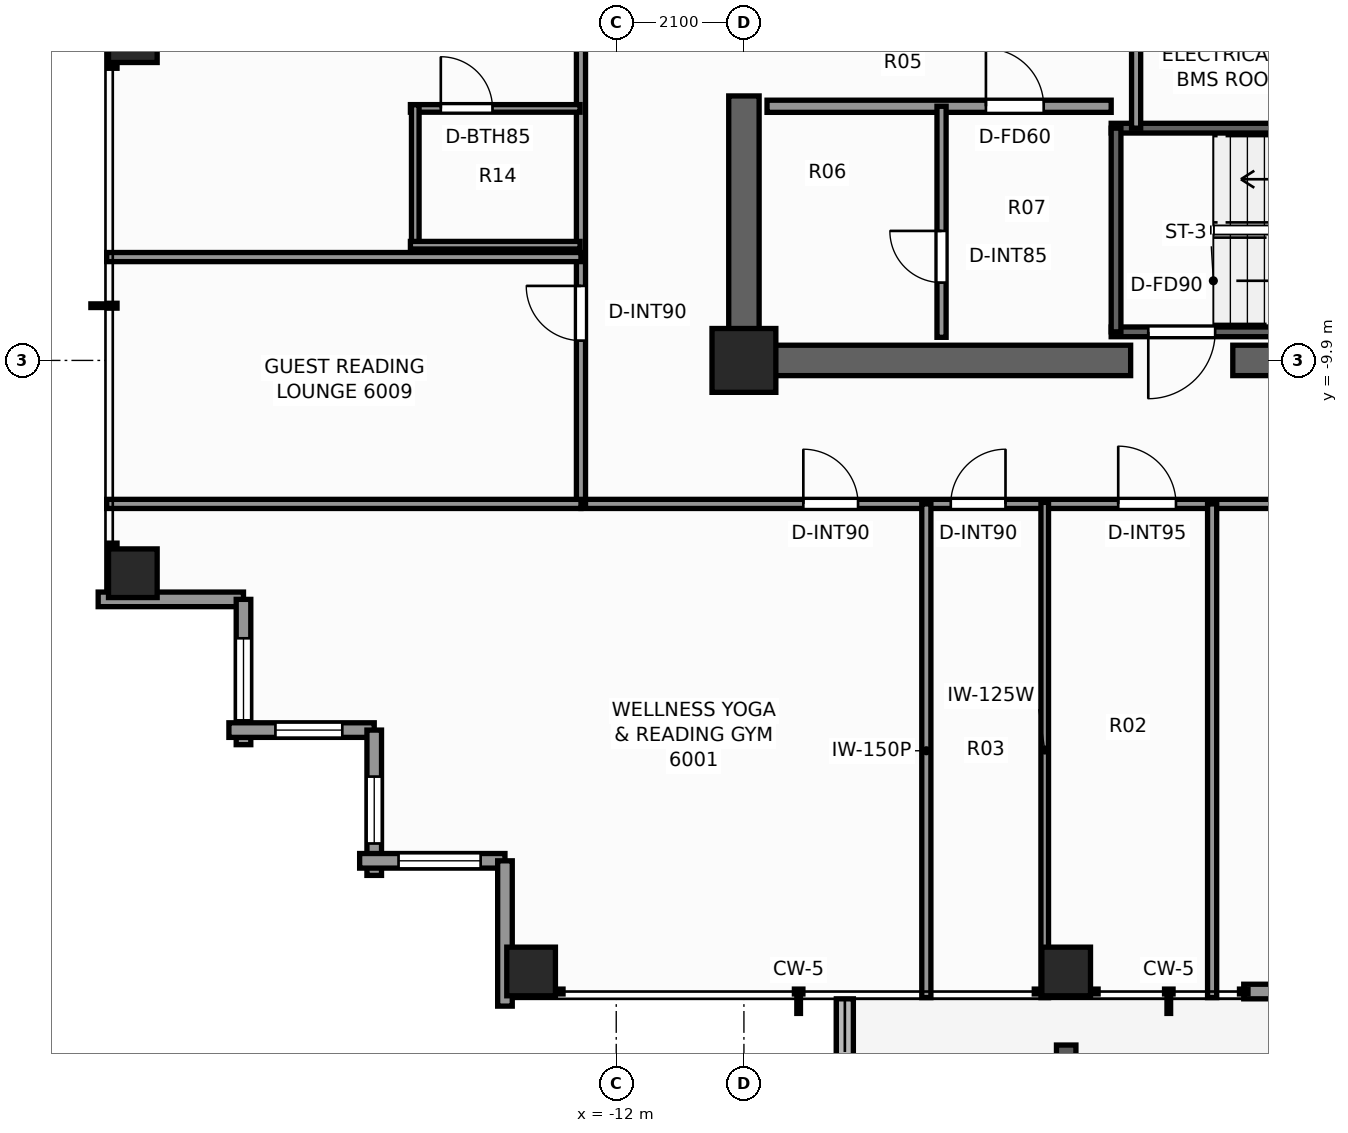
"""IFC4 building model, lengths in metres.
Left out: names, types, materials, properties, quantities, classifications, styles, units other than length and angle.
Written with IfcOpenShell. Run it as: python <this file> out.ifc"""

import sys

from ifc_helpers import new_model, si_unit, direction, frame, frame_2d, origin, origin_2d, place, context, subcontext, project, spatial, rectangle, extrude, element, fill, save


model = new_model("IFC4")
c1 = context("Model", 3, precision=1e-05, world=origin(), true_north=direction((0.0, 1.0)))
c2 = subcontext(c1, "Body", "Model", "MODEL_VIEW")
j1 = project(units=[si_unit("LENGTHUNIT", "METRE"), si_unit("PLANEANGLEUNIT", "RADIAN")], contexts=[c1])
p1 = place(None, origin())
s1 = spatial("IfcSite", under=j1, at=p1, CompositionType="ELEMENT")
p2 = place(p1, origin())
s2 = spatial("IfcBuilding", under=s1, at=p2, CompositionType="ELEMENT")
p3 = place(p2, frame((0.0, 0.0, 206.4)))
s3 = spatial("IfcBuildingStorey", under=s2, at=p3, CompositionType="ELEMENT", Elevation=206.4)
p4 = place(p3, frame((10.15, -9.9, 0.0), z_axis=(0.0, 0.0, 1.0), x_axis=(-1.0, 0.0, 0.0)))
e1 = element("IfcWall", 1, at=p4, inside=s3, PredefinedType="SHEAR", context=c2, shape_type="SweptSolid", body=[
    extrude(rectangle(XDim=12.01, YDim=0.5, at=frame_2d((6.005, 0.0))), origin(), (0.0, 0.0, 1.0), 3.3),
])
p5 = place(p3, frame((-3.54, -9.9, 0.0), z_axis=(0.0, 0.0, 1.0), x_axis=(-1.0, 0.0, 0.0)))
e2 = element("IfcWall", 2, at=p5, inside=s3, PredefinedType="SHEAR", context=c2, shape_type="SweptSolid", body=[
    extrude(rectangle(XDim=6.61, YDim=0.5, at=frame_2d((3.305, 0.0))), origin(), (0.0, 0.0, 1.0), 3.3),
])
p6 = place(p3, frame((-9.9, -9.65, 0.0), z_axis=(0.0, 0.0, 1.0), x_axis=(0.0, 1.0, 0.0)))
e3 = element("IfcWall", 3, at=p6, inside=s3, PredefinedType="SHEAR", context=c2, shape_type="SweptSolid", body=[
    extrude(rectangle(XDim=4.1, YDim=0.5, at=frame_2d((2.05, 0.0))), origin(), (0.0, 0.0, 1.0), 3.3),
])
p7 = place(p3, frame((-9.9, -9.9, 0.0), z_axis=(0.0, 0.0, 1.0), x_axis=(1.0, 0.0, 0.0)))
e4 = element("IfcColumn", 4, at=p7, inside=s3, PredefinedType="COLUMN", context=c2, shape_type="SweptSolid", body=[
    extrude(rectangle(XDim=1.05, YDim=1.05, at=origin_2d()), origin(), (0.0, 0.0, 1.0), 3.3),
])
for number, where, z_axis, x_axis in (
    (5, (-13.4, -19.95, 0.0), (0.0, 0.0, 1.0), (1.0, 0.0, 0.0)),
    (6, (-4.6, -19.95, 0.0), (0.0, 0.0, 1.0), (1.0, 0.0, 0.0)),
    (7, (-19.95, -13.4, 0.0), (0.0, 0.0, 1.0), (1.0, 0.0, 0.0)),
    (8, (-19.95, -4.6, 0.0), (0.0, 0.0, 1.0), (1.0, 0.0, 0.0)),
):
    element("IfcColumn", number, at=place(p3, frame(where, z_axis=z_axis, x_axis=x_axis)), inside=s3, PredefinedType="COLUMN", context=c2, shape_type="SweptSolid", body=[
        extrude(rectangle(XDim=0.8, YDim=0.8, at=origin_2d()), origin(), (0.0, 0.0, 1.0), 3.3),
    ])
p8 = place(p3, frame((-8.24, -20.4, -0.04), z_axis=(0.0, 0.0, 1.0), x_axis=(0.0, -1.0, 0.0)))
e9 = element("IfcWall", 9, at=p8, inside=s3, PredefinedType="PARAPET", context=c2, shape_type="SweptSolid", body=[
    extrude(rectangle(XDim=3.42, YDim=0.28, at=frame_2d((1.71, 0.0))), origin(), (0.0, 0.0, 1.0), 0.42),
])
p9 = place(p3, frame((1.68, -20.28, 0.0), z_axis=(0.0, 0.0, 1.0), x_axis=(-1.0, 0.0, 0.0)))
e10 = element("IfcWall", 10, at=p9, inside=s3, PredefinedType="STANDARD", context=c2, shape_type="SweptSolid", body=[
    extrude(rectangle(XDim=3.36, YDim=0.24, at=frame_2d((1.68, 0.0))), origin(), (0.0, 0.0, 1.0), 3.08),
])
p10 = place(p9, frame((0.78, 0.0, 0.0)))
e11 = element("IfcOpeningElement", 11, at=p10, cuts=e10, PredefinedType="OPENING", context=c2, shape_type="SweptSolid", body=[
    extrude(rectangle(XDim=1.8, YDim=2.2, at=frame_2d((0.9, 1.1))), frame((0.0, 0.13, 0.0), z_axis=(0.0, -1.0, 0.0), x_axis=(1.0, 0.0, 0.0)), (0.0, 0.0, 1.0), 0.26),
])
p11 = place(p3, frame((-18.13, -13.83, 0.0), z_axis=(0.0, 0.0, 1.0), x_axis=(-1.0, 0.0, 0.0)))
e12 = element("IfcWall", 12, at=p11, inside=s3, PredefinedType="STANDARD", context=c2, shape_type="SweptSolid", body=[
    extrude(rectangle(XDim=2.39, YDim=0.24, at=frame_2d((1.195, 0.0))), origin(), (0.0, 0.0, 1.0), 2.463),
])
p12 = place(p3, frame((-18.13, -16.22, 0.0), z_axis=(0.0, 0.0, 1.0), x_axis=(0.0, 1.0, 0.0)))
e13 = element("IfcWall", 13, at=p12, inside=s3, PredefinedType="STANDARD", context=c2, shape_type="SweptSolid", body=[
    extrude(rectangle(XDim=2.39, YDim=0.24, at=frame_2d((1.195, 0.0))), origin(), (0.0, 0.0, 1.0), 2.463),
])
p13 = place(p12, frame((0.4, 0.0, 0.65)))
e14 = element("IfcOpeningElement", 14, at=p13, cuts=e13, PredefinedType="OPENING", context=c2, shape_type="SweptSolid", body=[
    extrude(rectangle(XDim=1.35, YDim=1.55, at=frame_2d((0.675, 0.775))), frame((0.0, 0.13, 0.0), z_axis=(0.0, -1.0, 0.0), x_axis=(1.0, 0.0, 0.0)), (0.0, 0.0, 1.0), 0.26),
])
p14 = place(p3, frame((-15.98, -15.98, 0.0), z_axis=(0.0, 0.0, 1.0), x_axis=(-1.0, 0.0, 0.0)))
e15 = element("IfcWall", 15, at=p14, inside=s3, PredefinedType="STANDARD", context=c2, shape_type="SweptSolid", body=[
    extrude(rectangle(XDim=2.39, YDim=0.24, at=frame_2d((1.195, 0.0))), origin(), (0.0, 0.0, 1.0), 2.463),
])
p15 = place(p14, frame((0.525, 0.0, 0.65)))
e16 = element("IfcOpeningElement", 16, at=p15, cuts=e15, PredefinedType="OPENING", context=c2, shape_type="SweptSolid", body=[
    extrude(rectangle(XDim=1.1, YDim=1.45, at=frame_2d((0.55, 0.725))), frame((0.0, 0.13, 0.0), z_axis=(0.0, -1.0, 0.0), x_axis=(1.0, 0.0, 0.0)), (0.0, 0.0, 1.0), 0.26),
])
p16 = place(p3, frame((-15.98, -18.37, 0.0), z_axis=(0.0, 0.0, 1.0), x_axis=(0.0, 1.0, 0.0)))
e17 = element("IfcWall", 17, at=p16, inside=s3, PredefinedType="STANDARD", context=c2, shape_type="SweptSolid", body=[
    extrude(rectangle(XDim=2.39, YDim=0.24, at=frame_2d((1.195, 0.0))), origin(), (0.0, 0.0, 1.0), 2.463),
])
p17 = place(p16, frame((0.525, 0.0, 0.65)))
e18 = element("IfcOpeningElement", 18, at=p17, cuts=e17, PredefinedType="OPENING", context=c2, shape_type="SweptSolid", body=[
    extrude(rectangle(XDim=1.1, YDim=1.45, at=frame_2d((0.55, 0.725))), frame((0.0, 0.13, 0.0), z_axis=(0.0, -1.0, 0.0), x_axis=(1.0, 0.0, 0.0)), (0.0, 0.0, 1.0), 0.26),
])
p18 = place(p3, frame((-13.83, -18.13, 0.0), z_axis=(0.0, 0.0, 1.0), x_axis=(-1.0, 0.0, 0.0)))
e19 = element("IfcWall", 19, at=p18, inside=s3, PredefinedType="STANDARD", context=c2, shape_type="SweptSolid", body=[
    extrude(rectangle(XDim=2.39, YDim=0.24, at=frame_2d((1.195, 0.0))), origin(), (0.0, 0.0, 1.0), 2.463),
])
p19 = place(p18, frame((0.4, 0.0, 0.65)))
e20 = element("IfcOpeningElement", 20, at=p19, cuts=e19, PredefinedType="OPENING", context=c2, shape_type="SweptSolid", body=[
    extrude(rectangle(XDim=1.35, YDim=1.55, at=frame_2d((0.675, 0.775))), frame((0.0, 0.13, 0.0), z_axis=(0.0, -1.0, 0.0), x_axis=(1.0, 0.0, 0.0)), (0.0, 0.0, 1.0), 0.26),
])
p20 = place(p3, frame((-13.83, -20.52, 0.0), z_axis=(0.0, 0.0, 1.0), x_axis=(0.0, 1.0, 0.0)))
e21 = element("IfcWall", 21, at=p20, inside=s3, PredefinedType="STANDARD", context=c2, shape_type="SweptSolid", body=[
    extrude(rectangle(XDim=2.39, YDim=0.24, at=frame_2d((1.195, 0.0))), origin(), (0.0, 0.0, 1.0), 2.463),
])
p21 = place(p3, frame((3.86, -9.43, 0.0), z_axis=(0.0, 0.0, 1.0), x_axis=(-1.0, 0.0, 0.0)))
e22 = element("IfcWall", 22, at=p21, inside=s3, PredefinedType="SHEAR", context=c2, shape_type="SweptSolid", body=[
    extrude(rectangle(XDim=7.72, YDim=0.16, at=frame_2d((3.86, 0.0))), origin(), (0.0, 0.0, 1.0), 3.3),
])
p22 = place(p21, frame((6.01, 0.0, 0.0)))
e23 = element("IfcOpeningElement", 23, at=p22, cuts=e22, PredefinedType="OPENING", context=c2, shape_type="SweptSolid", body=[
    extrude(rectangle(XDim=1.1, YDim=2.2, at=frame_2d((0.55, 1.1))), frame((0.0, 0.09, 0.0), z_axis=(0.0, -1.0, 0.0), x_axis=(1.0, 0.0, 0.0)), (0.0, 0.0, 1.0), 0.18),
])
p23 = place(p3, frame((-3.86, -6.08, 0.0), z_axis=(0.0, 0.0, 1.0), x_axis=(1.0, 0.0, 0.0)))
e24 = element("IfcWall", 24, at=p23, inside=s3, PredefinedType="SHEAR", context=c2, shape_type="SweptSolid", body=[
    extrude(rectangle(XDim=7.72, YDim=0.16, at=frame_2d((3.86, 0.0))), origin(), (0.0, 0.0, 1.0), 3.3),
])
p24 = place(p3, frame((-3.78, -9.43, 0.0), z_axis=(0.0, 0.0, 1.0), x_axis=(0.0, 1.0, 0.0)))
e25 = element("IfcWall", 25, at=p24, inside=s3, PredefinedType="SHEAR", context=c2, shape_type="SweptSolid", body=[
    extrude(rectangle(XDim=3.35, YDim=0.16, at=frame_2d((1.675, 0.0))), origin(), (0.0, 0.0, 1.0), 3.3),
])
p25 = place(p3, frame((-9.52, -5.72, 0.0), z_axis=(0.0, 0.0, 1.0), x_axis=(1.0, 0.0, 0.0)))
e26 = element("IfcWall", 26, at=p25, inside=s3, PredefinedType="SOLIDWALL", context=c2, shape_type="SweptSolid", body=[
    extrude(rectangle(XDim=5.66, YDim=0.2, at=frame_2d((2.83, 0.0))), origin(), (0.0, 0.0, 1.0), 3.08),
])
p26 = place(p25, frame((3.6, 0.0, 0.0)))
e27 = element("IfcOpeningElement", 27, at=p26, cuts=e26, PredefinedType="OPENING", context=c2, shape_type="SweptSolid", body=[
    extrude(rectangle(XDim=0.95, YDim=2.06, at=frame_2d((0.475, 1.03))), frame((0.0, 0.11, 0.0), z_axis=(0.0, -1.0, 0.0), x_axis=(1.0, 0.0, 0.0)), (0.0, 0.0, 1.0), 0.22),
])
p27 = place(p3, frame((-6.65, -9.52, 0.0), z_axis=(0.0, 0.0, 1.0), x_axis=(0.0, 1.0, 0.0)))
e28 = element("IfcWall", 28, at=p27, inside=s3, PredefinedType="PARTITIONING", context=c2, shape_type="SweptSolid", body=[
    extrude(rectangle(XDim=3.8, YDim=0.15, at=frame_2d((1.9, 0.0))), origin(), (0.0, 0.0, 1.0), 3.08),
])
p28 = place(p27, frame((0.9, 0.0, 0.0)))
e29 = element("IfcOpeningElement", 29, at=p28, cuts=e28, PredefinedType="OPENING", context=c2, shape_type="SweptSolid", body=[
    extrude(rectangle(XDim=0.85, YDim=2.03, at=frame_2d((0.425, 1.015))), frame((0.0, 0.085, 0.0), z_axis=(0.0, -1.0, 0.0), x_axis=(1.0, 0.0, 0.0)), (0.0, 0.0, 1.0), 0.17),
])
p29 = place(p3, frame((-3.45, -6.08, 0.0), z_axis=(0.0, 0.0, 1.0), x_axis=(0.0, 1.0, 0.0)))
e30 = element("IfcWall", 30, at=p29, inside=s3, PredefinedType="PARTITIONING", context=c2, shape_type="SweptSolid", body=[
    extrude(rectangle(XDim=2.36, YDim=0.15, at=frame_2d((1.18, 0.0))), origin(), (0.0, 0.0, 1.0), 3.08),
])
p30 = place(p3, frame((-12.58, -12.26, 0.0), z_axis=(0.0, 0.0, 1.0), x_axis=(1.0, 0.0, 0.0)))
e31 = element("IfcWall", 31, at=p30, inside=s3, PredefinedType="PARTITIONING", context=c2, shape_type="SweptSolid", body=[
    extrude(rectangle(XDim=25.16, YDim=0.15, at=frame_2d((12.58, 0.0))), origin(), (0.0, 0.0, 1.0), 2.369),
])
p31 = place(p30, frame((3.657, 0.0, 0.0)))
e32 = element("IfcOpeningElement", 32, at=p31, cuts=e31, PredefinedType="OPENING", context=c2, shape_type="SweptSolid", body=[
    extrude(rectangle(XDim=0.9, YDim=2.06, at=frame_2d((0.45, 1.03))), frame((0.0, 0.085, 0.0), z_axis=(0.0, -1.0, 0.0), x_axis=(1.0, 0.0, 0.0)), (0.0, 0.0, 1.0), 0.17),
])
p32 = place(p30, frame((6.082, 0.0, 0.0)))
e33 = element("IfcOpeningElement", 33, at=p32, cuts=e31, PredefinedType="OPENING", context=c2, shape_type="SweptSolid", body=[
    extrude(rectangle(XDim=0.9, YDim=2.06, at=frame_2d((0.45, 1.03))), frame((0.0, 0.085, 0.0), z_axis=(0.0, -1.0, 0.0), x_axis=(1.0, 0.0, 0.0)), (0.0, 0.0, 1.0), 0.17),
])
p33 = place(p30, frame((8.836, 0.0, 0.0)))
e34 = element("IfcOpeningElement", 34, at=p33, cuts=e31, PredefinedType="OPENING", context=c2, shape_type="SweptSolid", body=[
    extrude(rectangle(XDim=0.95, YDim=2.06, at=frame_2d((0.475, 1.03))), frame((0.0, 0.085, 0.0), z_axis=(0.0, -1.0, 0.0), x_axis=(1.0, 0.0, 0.0)), (0.0, 0.0, 1.0), 0.17),
])
p34 = place(p30, frame((14.16, 0.0, 0.0)))
e35 = element("IfcOpeningElement", 35, at=p34, cuts=e31, PredefinedType="OPENING", context=c2, shape_type="SweptSolid", body=[
    extrude(rectangle(XDim=0.9, YDim=2.06, at=frame_2d((0.45, 1.03))), frame((0.0, 0.085, 0.0), z_axis=(0.0, -1.0, 0.0), x_axis=(1.0, 0.0, 0.0)), (0.0, 0.0, 1.0), 0.17),
])
p35 = place(p30, frame((20.341, 0.0, 0.0)))
e36 = element("IfcOpeningElement", 36, at=p35, cuts=e31, PredefinedType="OPENING", context=c2, shape_type="SweptSolid", body=[
    extrude(rectangle(XDim=0.9, YDim=2.06, at=frame_2d((0.45, 1.03))), frame((0.0, 0.085, 0.0), z_axis=(0.0, -1.0, 0.0), x_axis=(1.0, 0.0, 0.0)), (0.0, 0.0, 1.0), 0.17),
])
p36 = place(p3, frame((-12.58, -12.26, 0.0), z_axis=(0.0, 0.0, 1.0), x_axis=(0.0, 1.0, 0.0)))
e37 = element("IfcWall", 37, at=p36, inside=s3, PredefinedType="PARTITIONING", context=c2, shape_type="SweptSolid", body=[
    extrude(rectangle(XDim=24.84, YDim=0.15, at=frame_2d((12.42, 0.0))), origin(), (0.0, 0.0, 1.0), 2.369),
])
p37 = place(p36, frame((2.686, 0.0, 0.0)))
e38 = element("IfcOpeningElement", 38, at=p37, cuts=e37, PredefinedType="OPENING", context=c2, shape_type="SweptSolid", body=[
    extrude(rectangle(XDim=0.9, YDim=2.06, at=frame_2d((0.45, 1.03))), frame((0.0, 0.085, 0.0), z_axis=(0.0, -1.0, 0.0), x_axis=(1.0, 0.0, 0.0)), (0.0, 0.0, 1.0), 0.17),
])
p38 = place(p36, frame((9.755, 0.0, 0.0)))
e39 = element("IfcOpeningElement", 39, at=p38, cuts=e37, PredefinedType="OPENING", context=c2, shape_type="SweptSolid", body=[
    extrude(rectangle(XDim=0.95, YDim=2.06, at=frame_2d((0.475, 1.03))), frame((0.0, 0.085, 0.0), z_axis=(0.0, -1.0, 0.0), x_axis=(1.0, 0.0, 0.0)), (0.0, 0.0, 1.0), 0.17),
])
p39 = place(p36, frame((19.32, 0.0, 0.0)))
e40 = element("IfcOpeningElement", 40, at=p39, cuts=e37, PredefinedType="OPENING", context=c2, shape_type="SweptSolid", body=[
    extrude(rectangle(XDim=0.95, YDim=2.06, at=frame_2d((0.475, 1.03))), frame((0.0, 0.085, 0.0), z_axis=(0.0, -1.0, 0.0), x_axis=(1.0, 0.0, 0.0)), (0.0, 0.0, 1.0), 0.17),
])
p40 = place(p3, frame((-20.38, -12.26, 0.0), z_axis=(0.0, 0.0, 1.0), x_axis=(1.0, 0.0, 0.0)))
e41 = element("IfcWall", 41, at=p40, inside=s3, PredefinedType="PARTITIONING", context=c2, shape_type="SweptSolid", body=[
    extrude(rectangle(XDim=7.8, YDim=0.15, at=frame_2d((3.9, 0.0))), origin(), (0.0, 0.0, 1.0), 2.369),
])
for number, where, z_axis, x_axis in (
    (42, (-6.9, -20.38, 0.0), (0.0, 0.0, 1.0), (0.0, 1.0, 0.0)),
    (43, (-2.2, -20.38, 0.0), (0.0, 0.0, 1.0), (0.0, 1.0, 0.0)),
):
    element("IfcWall", number, at=place(p3, frame(where, z_axis=z_axis, x_axis=x_axis)), inside=s3, PredefinedType="PARTITIONING", context=c2, shape_type="SweptSolid", body=[
        extrude(rectangle(XDim=8.12, YDim=0.15, at=frame_2d((4.06, 0.0))), origin(), (0.0, 0.0, 1.0), 2.453),
    ])
p41 = place(p3, frame((-4.953, -20.38, 0.0), z_axis=(0.0, 0.0, 1.0), x_axis=(0.0, 1.0, 0.0)))
e44 = element("IfcWall", 44, at=p41, inside=s3, PredefinedType="PARTITIONING", context=c2, shape_type="SweptSolid", body=[
    extrude(rectangle(XDim=8.145, YDim=0.125, at=frame_2d((4.072, 0.0))), origin(), (0.0, 0.0, 1.0), 2.453),
])
p42 = place(p3, frame((-20.38, -8.2, 0.0), z_axis=(0.0, 0.0, 1.0), x_axis=(1.0, 0.0, 0.0)))
e45 = element("IfcWall", 45, at=p42, inside=s3, PredefinedType="PARTITIONING", context=c2, shape_type="SweptSolid", body=[
    extrude(rectangle(XDim=7.8, YDim=0.15, at=frame_2d((3.9, 0.0))), origin(), (0.0, 0.0, 1.0), 2.453),
])
p43 = place(p3, frame((-15.385, -5.755, 0.0), z_axis=(0.0, 0.0, 1.0), x_axis=(1.0, 0.0, 0.0)))
e46 = element("IfcWall", 46, at=p43, inside=s3, PredefinedType="PARTITIONING", context=c2, shape_type="SweptSolid", body=[
    extrude(rectangle(XDim=2.79, YDim=0.125, at=frame_2d((1.395, 0.0))), origin(), (0.0, 0.0, 1.0), 3.08),
])
p44 = place(p43, frame((0.5, 0.0, 0.0)))
e47 = element("IfcOpeningElement", 47, at=p44, cuts=e46, PredefinedType="OPENING", context=c2, shape_type="SweptSolid", body=[
    extrude(rectangle(XDim=0.85, YDim=2.03, at=frame_2d((0.425, 1.015))), frame((0.0, 0.073, 0.0), z_axis=(0.0, -1.0, 0.0), x_axis=(1.0, 0.0, 0.0)), (0.0, 0.0, 1.0), 0.145),
])
p45 = place(p3, frame((-15.305, -8.065, 0.0), z_axis=(0.0, 0.0, 1.0), x_axis=(0.0, 1.0, 0.0)))
e48 = element("IfcWall", 48, at=p45, inside=s3, PredefinedType="PARTITIONING", context=c2, shape_type="SweptSolid", body=[
    extrude(rectangle(XDim=2.37, YDim=0.125, at=frame_2d((1.185, 0.0))), origin(), (0.0, 0.0, 1.0), 3.08),
])
p46 = place(p3, frame((-15.385, -8.005, 0.0), z_axis=(0.0, 0.0, 1.0), x_axis=(1.0, 0.0, 0.0)))
e49 = element("IfcWall", 49, at=p46, inside=s3, PredefinedType="PARTITIONING", context=c2, shape_type="SweptSolid", body=[
    extrude(rectangle(XDim=2.79, YDim=0.125, at=frame_2d((1.395, 0.0))), origin(), (0.0, 0.0, 1.0), 3.08),
])
p47 = place(p13, origin())
e50 = element("IfcWindow", 50, at=p47, inside=s3, PartitioningType="SINGLE_PANEL", PredefinedType="WINDOW", context=c2, shape_type="SweptSolid", body=[
    extrude(rectangle(XDim=1.35, YDim=1.55, at=frame_2d((0.675, 0.775))), frame((0.0, 0.03, 0.0), z_axis=(0.0, -1.0, 0.0), x_axis=(1.0, 0.0, 0.0)), (0.0, 0.0, 1.0), 0.06),
])
fill(e14, e50)
p48 = place(p15, origin())
e51 = element("IfcWindow", 51, at=p48, inside=s3, PartitioningType="SINGLE_PANEL", PredefinedType="WINDOW", context=c2, shape_type="SweptSolid", body=[
    extrude(rectangle(XDim=1.1, YDim=1.45, at=frame_2d((0.55, 0.725))), frame((0.0, 0.03, 0.0), z_axis=(0.0, -1.0, 0.0), x_axis=(1.0, 0.0, 0.0)), (0.0, 0.0, 1.0), 0.06),
])
fill(e16, e51)
p49 = place(p17, origin())
e52 = element("IfcWindow", 52, at=p49, inside=s3, PartitioningType="SINGLE_PANEL", PredefinedType="WINDOW", context=c2, shape_type="SweptSolid", body=[
    extrude(rectangle(XDim=1.1, YDim=1.45, at=frame_2d((0.55, 0.725))), frame((0.0, 0.03, 0.0), z_axis=(0.0, -1.0, 0.0), x_axis=(1.0, 0.0, 0.0)), (0.0, 0.0, 1.0), 0.06),
])
fill(e18, e52)
p50 = place(p19, origin())
e53 = element("IfcWindow", 53, at=p50, inside=s3, PartitioningType="SINGLE_PANEL", PredefinedType="WINDOW", context=c2, shape_type="SweptSolid", body=[
    extrude(rectangle(XDim=1.35, YDim=1.55, at=frame_2d((0.675, 0.775))), frame((0.0, 0.03, 0.0), z_axis=(0.0, -1.0, 0.0), x_axis=(1.0, 0.0, 0.0)), (0.0, 0.0, 1.0), 0.06),
])
fill(e20, e53)
p51 = place(p22, origin())
e54 = element("IfcDoor", 54, at=p51, inside=s3, OperationType="SINGLE_SWING_RIGHT", PredefinedType="DOOR", context=c2, shape_type="SweptSolid", body=[
    extrude(rectangle(XDim=1.1, YDim=2.2, at=frame_2d((0.55, 1.1))), frame((0.0, 0.025, 0.0), z_axis=(0.0, -1.0, 0.0), x_axis=(1.0, 0.0, 0.0)), (0.0, 0.0, 1.0), 0.05),
])
fill(e23, e54)
p52 = place(p26, origin())
e55 = element("IfcDoor", 55, at=p52, inside=s3, OperationType="SINGLE_SWING_LEFT", PredefinedType="DOOR", context=c2, shape_type="SweptSolid", body=[
    extrude(rectangle(XDim=0.95, YDim=2.06, at=frame_2d((0.475, 1.03))), frame((0.0, 0.025, 0.0), z_axis=(0.0, -1.0, 0.0), x_axis=(1.0, 0.0, 0.0)), (0.0, 0.0, 1.0), 0.05),
])
fill(e27, e55)
p53 = place(p28, origin())
e56 = element("IfcDoor", 56, at=p53, inside=s3, OperationType="SINGLE_SWING_RIGHT", PredefinedType="DOOR", context=c2, shape_type="SweptSolid", body=[
    extrude(rectangle(XDim=0.85, YDim=2.03, at=frame_2d((0.425, 1.015))), frame((0.0, 0.025, 0.0), z_axis=(0.0, -1.0, 0.0), x_axis=(1.0, 0.0, 0.0)), (0.0, 0.0, 1.0), 0.05),
])
fill(e29, e56)
p54 = place(p31, origin())
e57 = element("IfcDoor", 57, at=p54, inside=s3, OperationType="SINGLE_SWING_LEFT", PredefinedType="DOOR", context=c2, shape_type="SweptSolid", body=[
    extrude(rectangle(XDim=0.9, YDim=2.06, at=frame_2d((0.45, 1.03))), frame((0.0, 0.025, 0.0), z_axis=(0.0, -1.0, 0.0), x_axis=(1.0, 0.0, 0.0)), (0.0, 0.0, 1.0), 0.05),
])
fill(e32, e57)
p55 = place(p32, origin())
e58 = element("IfcDoor", 58, at=p55, inside=s3, OperationType="SINGLE_SWING_RIGHT", PredefinedType="DOOR", context=c2, shape_type="SweptSolid", body=[
    extrude(rectangle(XDim=0.9, YDim=2.06, at=frame_2d((0.45, 1.03))), frame((0.0, 0.025, 0.0), z_axis=(0.0, -1.0, 0.0), x_axis=(1.0, 0.0, 0.0)), (0.0, 0.0, 1.0), 0.05),
])
fill(e33, e58)
p56 = place(p33, origin())
e59 = element("IfcDoor", 59, at=p56, inside=s3, OperationType="SINGLE_SWING_LEFT", PredefinedType="DOOR", context=c2, shape_type="SweptSolid", body=[
    extrude(rectangle(XDim=0.95, YDim=2.06, at=frame_2d((0.475, 1.03))), frame((0.0, 0.025, 0.0), z_axis=(0.0, -1.0, 0.0), x_axis=(1.0, 0.0, 0.0)), (0.0, 0.0, 1.0), 0.05),
])
fill(e34, e59)
p57 = place(p37, origin())
e60 = element("IfcDoor", 60, at=p57, inside=s3, OperationType="SINGLE_SWING_RIGHT", PredefinedType="DOOR", context=c2, shape_type="SweptSolid", body=[
    extrude(rectangle(XDim=0.9, YDim=2.06, at=frame_2d((0.45, 1.03))), frame((0.0, 0.025, 0.0), z_axis=(0.0, -1.0, 0.0), x_axis=(1.0, 0.0, 0.0)), (0.0, 0.0, 1.0), 0.05),
])
fill(e38, e60)
p58 = place(p44, origin())
e61 = element("IfcDoor", 61, at=p58, inside=s3, OperationType="SINGLE_SWING_LEFT", PredefinedType="DOOR", context=c2, shape_type="SweptSolid", body=[
    extrude(rectangle(XDim=0.85, YDim=2.03, at=frame_2d((0.425, 1.015))), frame((0.0, 0.025, 0.0), z_axis=(0.0, -1.0, 0.0), x_axis=(1.0, 0.0, 0.0)), (0.0, 0.0, 1.0), 0.05),
])
fill(e47, e61)
save(model, sys.argv[1])
